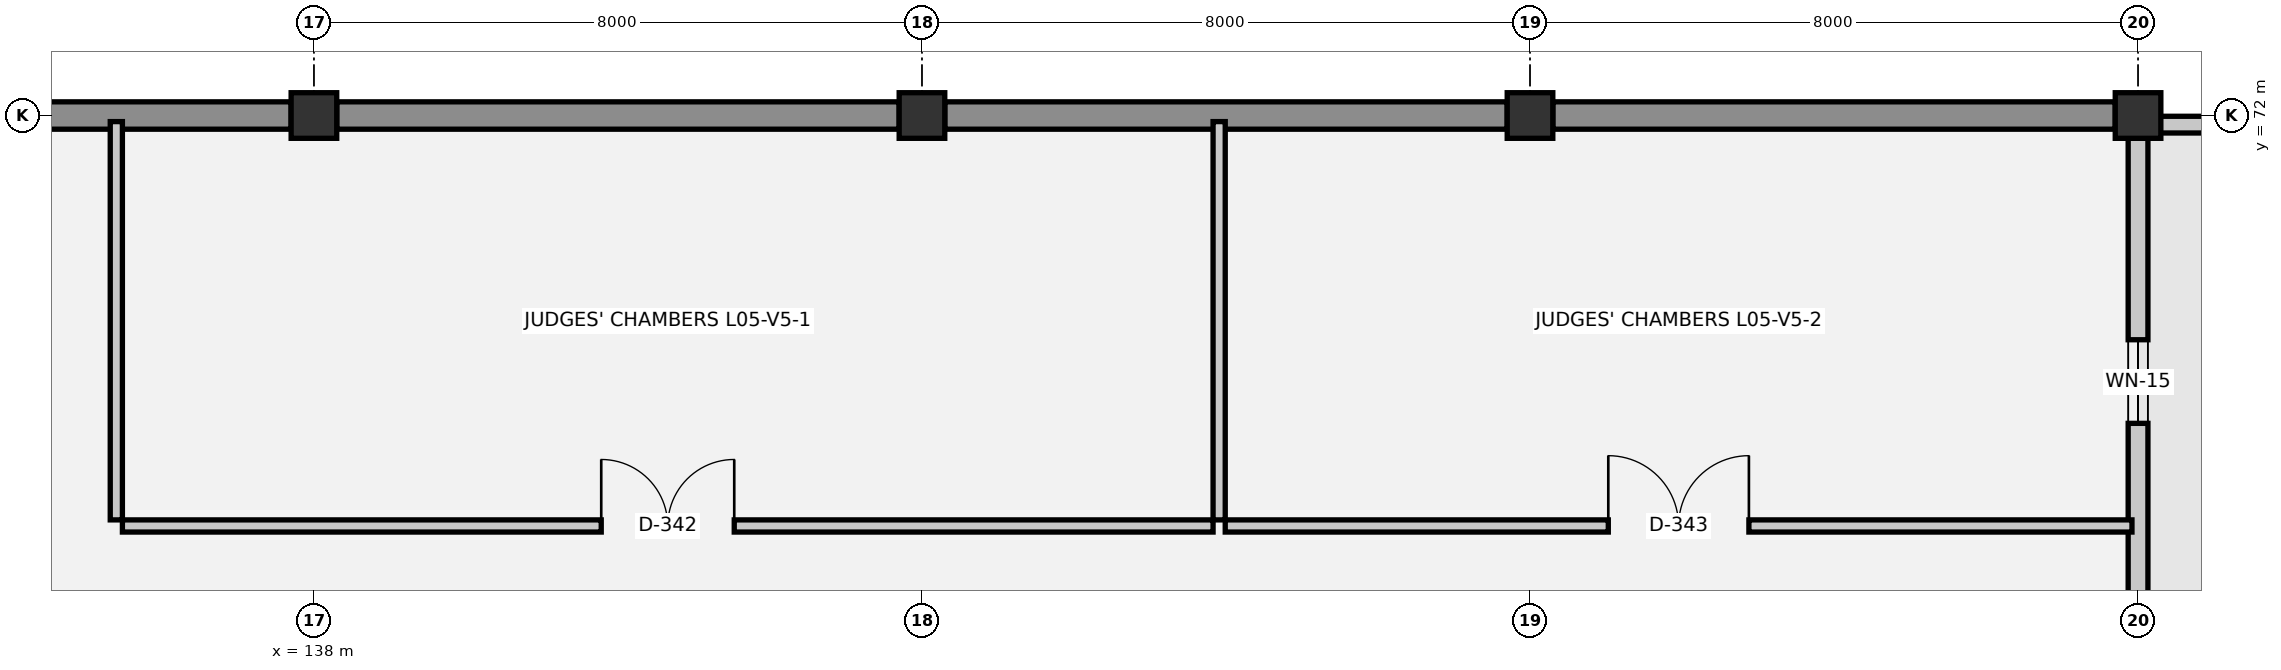
"""IFC4 building model, lengths in metres.
Left out: names, types, materials, properties, quantities, classifications, styles, units other than length and angle.
Written with IfcOpenShell. Run it as: python <this file> out.ifc"""

import sys

from ifc_helpers import new_model, si_unit, direction, frame, frame_2d, origin, origin_2d, place, context, subcontext, project, spatial, rectangle, extrude, element, fill, save


model = new_model("IFC4")
c1 = context("Model", 3, precision=1e-05, world=origin(), true_north=direction((0.0, 1.0)))
c2 = subcontext(c1, "Body", "Model", "MODEL_VIEW")
j1 = project(units=[si_unit("LENGTHUNIT", "METRE"), si_unit("PLANEANGLEUNIT", "RADIAN")], contexts=[c1])
p1 = place(None, origin())
s1 = spatial("IfcSite", under=j1, at=p1, CompositionType="ELEMENT")
p2 = place(p1, origin())
s2 = spatial("IfcBuilding", under=s1, at=p2, CompositionType="ELEMENT")
p3 = place(p2, frame((0.0, 0.0, 18.3)))
s3 = spatial("IfcBuildingStorey", under=s2, at=p3, CompositionType="ELEMENT", Elevation=18.3)
for number, where, z_axis, x_axis in (
    (1, (138.0, 72.0, 0.0), (0.0, 0.0, 1.0), (1.0, 0.0, 0.0)),
    (2, (146.0, 72.0, 0.0), (0.0, 0.0, 1.0), (1.0, 0.0, 0.0)),
    (3, (154.0, 72.0, 0.0), (0.0, 0.0, 1.0), (1.0, 0.0, 0.0)),
    (4, (162.0, 72.0, 0.0), (0.0, 0.0, 1.0), (1.0, 0.0, 0.0)),
):
    element("IfcColumn", number, at=place(p3, frame(where, z_axis=z_axis, x_axis=x_axis)), inside=s3, PredefinedType="COLUMN", context=c2, shape_type="SweptSolid", body=[
        extrude(rectangle(XDim=0.6, YDim=0.6, at=origin_2d()), origin(), (0.0, 0.0, 1.0), 3.75),
    ])
for number, where, z_axis, x_axis in (
    (5, (130.3, 72.0, 0.0), (0.0, 0.0, 1.0), (1.0, 0.0, 0.0)),
    (6, (138.3, 72.0, 0.0), (0.0, 0.0, 1.0), (1.0, 0.0, 0.0)),
    (7, (146.3, 72.0, 0.0), (0.0, 0.0, 1.0), (1.0, 0.0, 0.0)),
    (8, (154.3, 72.0, 0.0), (0.0, 0.0, 1.0), (1.0, 0.0, 0.0)),
):
    element("IfcWall", number, at=place(p3, frame(where, z_axis=z_axis, x_axis=x_axis)), inside=s3, PredefinedType="SOLIDWALL", context=c2, shape_type="SweptSolid", body=[
        extrude(rectangle(XDim=7.4, YDim=0.36, at=frame_2d((3.7, 0.0))), origin(), (0.0, 0.0, 1.0), 3.47),
    ])
p4 = place(p3, frame((162.0, 71.7, 0.0), z_axis=(0.0, 0.0, 1.0), x_axis=(0.0, -1.0, 0.0)))
e9 = element("IfcWall", 9, at=p4, inside=s3, PredefinedType="SOLIDWALL", context=c2, shape_type="SweptSolid", body=[
    extrude(rectangle(XDim=6.4, YDim=0.26, at=frame_2d((3.2, 0.0))), origin(), (0.0, 0.0, 1.0), 2.55),
])
p5 = place(p4, frame((2.65, 0.0, 1.0)))
e10 = element("IfcOpeningElement", 10, at=p5, cuts=e9, PredefinedType="OPENING", context=c2, shape_type="SweptSolid", body=[
    extrude(rectangle(XDim=1.1, YDim=1.2, at=frame_2d((0.55, 0.6))), frame((0.0, 0.14, 0.0), z_axis=(0.0, -1.0, 0.0), x_axis=(1.0, 0.0, 0.0)), (0.0, 0.0, 1.0), 0.28),
])
p6 = place(p3, frame((162.23, 71.88, 0.0), z_axis=(0.0, 0.0, 1.0), x_axis=(1.0, 0.0, 0.0)))
e11 = element("IfcWall", 11, at=p6, inside=s3, PredefinedType="PARAPET", context=c2, shape_type="SweptSolid", body=[
    extrude(rectangle(XDim=7.54, YDim=0.22, at=frame_2d((3.77, 0.0))), origin(), (0.0, 0.0, 1.0), 1.12),
])
p7 = place(p3, frame((135.48, 66.6, 0.0), z_axis=(0.0, 0.0, 1.0), x_axis=(1.0, 0.0, 0.0)))
e12 = element("IfcWall", 12, at=p7, inside=s3, PredefinedType="PARTITIONING", context=c2, shape_type="SweptSolid", body=[
    extrude(rectangle(XDim=14.35, YDim=0.16, at=frame_2d((7.175, 0.0))), origin(), (0.0, 0.0, 1.0), 3.39),
])
p8 = place(p7, frame((6.3, 0.0, 0.0)))
e13 = element("IfcOpeningElement", 13, at=p8, cuts=e12, PredefinedType="OPENING", context=c2, shape_type="SweptSolid", body=[
    extrude(rectangle(XDim=1.75, YDim=2.3, at=frame_2d((0.875, 1.15))), frame((0.0, 0.09, 0.0), z_axis=(0.0, -1.0, 0.0), x_axis=(1.0, 0.0, 0.0)), (0.0, 0.0, 1.0), 0.18),
])
p9 = place(p3, frame((149.99, 66.6, 0.0), z_axis=(0.0, 0.0, 1.0), x_axis=(1.0, 0.0, 0.0)))
e14 = element("IfcWall", 14, at=p9, inside=s3, PredefinedType="PARTITIONING", context=c2, shape_type="SweptSolid", body=[
    extrude(rectangle(XDim=11.93, YDim=0.16, at=frame_2d((5.965, 0.0))), origin(), (0.0, 0.0, 1.0), 3.39),
])
p10 = place(p9, frame((5.04, 0.0, 0.0)))
e15 = element("IfcOpeningElement", 15, at=p10, cuts=e14, PredefinedType="OPENING", context=c2, shape_type="SweptSolid", body=[
    extrude(rectangle(XDim=1.85, YDim=2.3, at=frame_2d((0.925, 1.15))), frame((0.0, 0.09, 0.0), z_axis=(0.0, -1.0, 0.0), x_axis=(1.0, 0.0, 0.0)), (0.0, 0.0, 1.0), 0.18),
])
for number, where, z_axis, x_axis in (
    (16, (135.4, 66.68, 0.0), (0.0, 0.0, 1.0), (0.0, 1.0, 0.0)),
    (17, (149.91, 66.68, 0.0), (0.0, 0.0, 1.0), (0.0, 1.0, 0.0)),
):
    element("IfcWall", number, at=place(p3, frame(where, z_axis=z_axis, x_axis=x_axis)), inside=s3, PredefinedType="PARTITIONING", context=c2, shape_type="SweptSolid", body=[
        extrude(rectangle(XDim=5.24, YDim=0.16, at=frame_2d((2.62, 0.0))), origin(), (0.0, 0.0, 1.0), 3.39),
    ])
p11 = place(p5, origin())
e18 = element("IfcWindow", 18, at=p11, inside=s3, PartitioningType="SINGLE_PANEL", PredefinedType="WINDOW", context=c2, shape_type="SweptSolid", body=[
    extrude(rectangle(XDim=1.1, YDim=1.2, at=frame_2d((0.55, 0.6))), frame((0.0, 0.03, 0.0), z_axis=(0.0, -1.0, 0.0), x_axis=(1.0, 0.0, 0.0)), (0.0, 0.0, 1.0), 0.06),
])
fill(e10, e18)
p12 = place(p8, origin())
e19 = element("IfcDoor", 19, at=p12, inside=s3, OperationType="DOUBLE_DOOR_SINGLE_SWING", PredefinedType="DOOR", context=c2, shape_type="SweptSolid", body=[
    extrude(rectangle(XDim=1.75, YDim=2.3, at=frame_2d((0.875, 1.15))), frame((0.0, 0.025, 0.0), z_axis=(0.0, -1.0, 0.0), x_axis=(1.0, 0.0, 0.0)), (0.0, 0.0, 1.0), 0.05),
])
fill(e13, e19)
p13 = place(p10, origin())
e20 = element("IfcDoor", 20, at=p13, inside=s3, OperationType="DOUBLE_DOOR_SINGLE_SWING", PredefinedType="DOOR", context=c2, shape_type="SweptSolid", body=[
    extrude(rectangle(XDim=1.85, YDim=2.3, at=frame_2d((0.925, 1.15))), frame((0.0, 0.025, 0.0), z_axis=(0.0, -1.0, 0.0), x_axis=(1.0, 0.0, 0.0)), (0.0, 0.0, 1.0), 0.05),
])
fill(e15, e20)
save(model, sys.argv[1])
